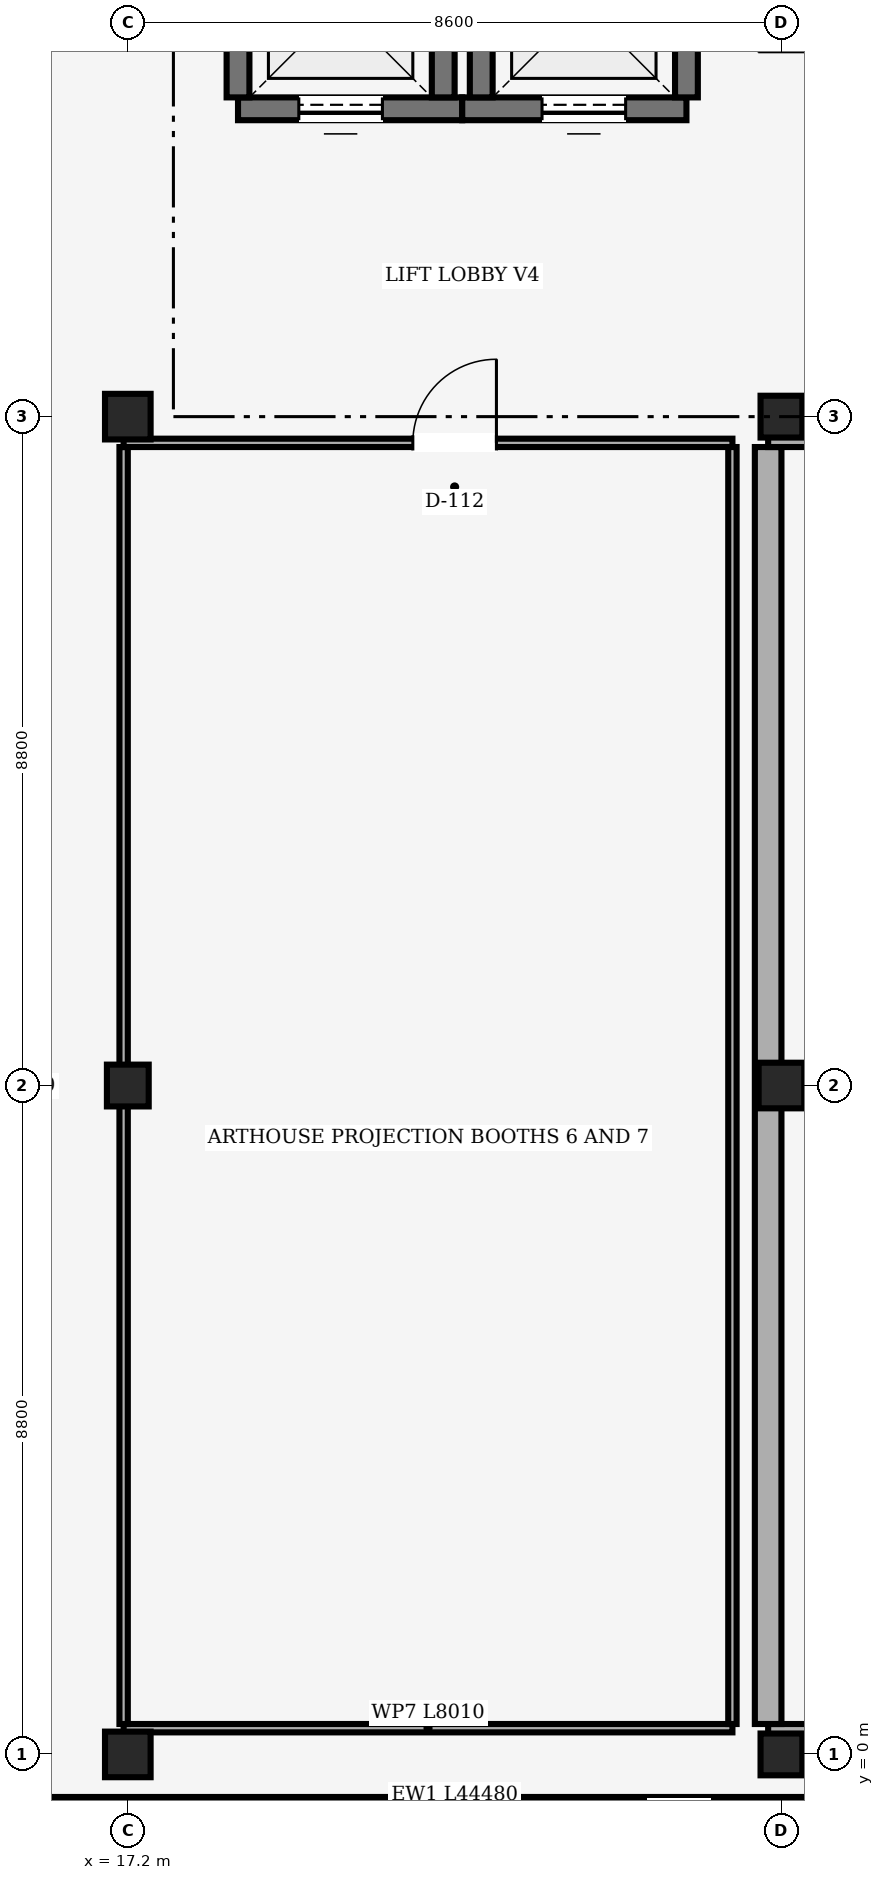
"""IFC4 building model, lengths in metres.
Left out: names, types, materials, properties, quantities, classifications, styles, units other than length and angle.
Written with IfcOpenShell. Run it as: python <this file> out.ifc"""

import sys

from ifc_helpers import new_model, si_unit, direction, frame, frame_2d, origin, origin_2d, place, context, subcontext, project, spatial, rectangle, extrude, element, fill, save


model = new_model("IFC4")
c1 = context("Model", 3, precision=1e-05, world=origin(), true_north=direction((0.0, 1.0)))
c2 = subcontext(c1, "Body", "Model", "MODEL_VIEW")
j1 = project(units=[si_unit("LENGTHUNIT", "METRE"), si_unit("PLANEANGLEUNIT", "RADIAN")], contexts=[c1])
p1 = place(None, origin())
s1 = spatial("IfcSite", under=j1, at=p1, CompositionType="ELEMENT")
p2 = place(p1, origin())
s2 = spatial("IfcBuilding", under=s1, at=p2, CompositionType="ELEMENT")
p3 = place(p2, frame((0.0, 0.0, 22.35)))
s3 = spatial("IfcBuildingStorey", under=s2, at=p3, CompositionType="ELEMENT", Elevation=22.35)
p4 = place(p3, frame((17.2, 0.0, 0.0), z_axis=(0.0, 0.0, 1.0), x_axis=(1.0, 0.0, 0.0)))
e1 = element("IfcColumn", 1, at=p4, inside=s3, PredefinedType="COLUMN", context=c2, shape_type="SweptSolid", body=[
    extrude(rectangle(XDim=0.6, YDim=0.6, at=origin_2d()), origin(), (0.0, 0.0, 1.0), 2.91),
])
p5 = place(p3, frame((17.2, 8.8, 0.0), z_axis=(0.0, 0.0, 1.0), x_axis=(1.0, 0.0, 0.0)))
e2 = element("IfcColumn", 2, at=p5, inside=s3, PredefinedType="COLUMN", context=c2, shape_type="SweptSolid", body=[
    extrude(rectangle(XDim=0.55, YDim=0.55, at=origin_2d()), origin(), (0.0, 0.0, 1.0), 2.91),
])
p6 = place(p3, frame((17.2, 17.6, 0.0), z_axis=(0.0, 0.0, 1.0), x_axis=(1.0, 0.0, 0.0)))
e3 = element("IfcColumn", 3, at=p6, inside=s3, PredefinedType="COLUMN", context=c2, shape_type="SweptSolid", body=[
    extrude(rectangle(XDim=0.6, YDim=0.6, at=origin_2d()), origin(), (0.0, 0.0, 1.0), 2.91),
])
p7 = place(p3, frame((25.8, 0.0, 0.0), z_axis=(0.0, 0.0, 1.0), x_axis=(1.0, 0.0, 0.0)))
e4 = element("IfcColumn", 4, at=p7, inside=s3, PredefinedType="COLUMN", context=c2, shape_type="SweptSolid", body=[
    extrude(rectangle(XDim=0.55, YDim=0.55, at=origin_2d()), origin(), (0.0, 0.0, 1.0), 2.91),
])
p8 = place(p3, frame((25.8, 8.8, 0.0), z_axis=(0.0, 0.0, 1.0), x_axis=(1.0, 0.0, 0.0)))
e5 = element("IfcColumn", 5, at=p8, inside=s3, PredefinedType="COLUMN", context=c2, shape_type="SweptSolid", body=[
    extrude(rectangle(XDim=0.6, YDim=0.6, at=origin_2d()), origin(), (0.0, 0.0, 1.0), 2.91),
])
p9 = place(p3, frame((25.8, 17.6, 0.0), z_axis=(0.0, 0.0, 1.0), x_axis=(1.0, 0.0, 0.0)))
e6 = element("IfcColumn", 6, at=p9, inside=s3, PredefinedType="COLUMN", context=c2, shape_type="SweptSolid", body=[
    extrude(rectangle(XDim=0.55, YDim=0.55, at=origin_2d()), origin(), (0.0, 0.0, 1.0), 2.91),
])
p10 = place(p3, frame((43.74, -0.74, 0.0), z_axis=(0.0, 0.0, 1.0), x_axis=(-1.0, 0.0, 0.0)))
e7 = element("IfcWall", 7, at=p10, inside=s3, PredefinedType="SOLIDWALL", context=c2, shape_type="SweptSolid", body=[
    extrude(rectangle(XDim=44.48, YDim=0.36, at=frame_2d((22.24, 0.0))), origin(), (0.0, 0.0, 1.0), 2.91),
])
p11 = place(p10, frame((9.05, 0.0, 0.36)))
e8 = element("IfcOpeningElement", 8, at=p11, cuts=e7, PredefinedType="OPENING", context=c2, shape_type="SweptSolid", body=[
    extrude(rectangle(XDim=0.28, YDim=0.28, at=frame_2d((0.14, 0.14))), frame((0.0, 0.18, 0.0), z_axis=(0.0, -1.0, 0.0), x_axis=(1.0, 0.0, 0.0)), (0.0, 0.0, 1.0), 0.36),
])
p12 = place(p10, frame((9.95, 0.0, 1.26)))
e9 = element("IfcOpeningElement", 9, at=p12, cuts=e7, PredefinedType="OPENING", context=c2, shape_type="SweptSolid", body=[
    extrude(rectangle(XDim=0.28, YDim=0.28, at=frame_2d((0.14, 0.14))), frame((0.0, 0.18, 0.0), z_axis=(0.0, -1.0, 0.0), x_axis=(1.0, 0.0, 0.0)), (0.0, 0.0, 1.0), 0.36),
])
p13 = place(p10, frame((10.85, 0.0, 1.26)))
e10 = element("IfcOpeningElement", 10, at=p13, cuts=e7, PredefinedType="OPENING", context=c2, shape_type="SweptSolid", body=[
    extrude(rectangle(XDim=0.28, YDim=0.28, at=frame_2d((0.14, 0.14))), frame((0.0, 0.18, 0.0), z_axis=(0.0, -1.0, 0.0), x_axis=(1.0, 0.0, 0.0)), (0.0, 0.0, 1.0), 0.36),
])
p14 = place(p10, frame((13.53, 0.0, 1.26)))
e11 = element("IfcOpeningElement", 11, at=p14, cuts=e7, PredefinedType="OPENING", context=c2, shape_type="SweptSolid", body=[
    extrude(rectangle(XDim=0.32, YDim=0.32, at=frame_2d((0.16, 0.16))), frame((0.0, 0.18, 0.0), z_axis=(0.0, -1.0, 0.0), x_axis=(1.0, 0.0, 0.0)), (0.0, 0.0, 1.0), 0.36),
])
p15 = place(p10, frame((14.44, 0.0, 2.16)))
e12 = element("IfcOpeningElement", 12, at=p15, cuts=e7, PredefinedType="OPENING", context=c2, shape_type="SweptSolid", body=[
    extrude(rectangle(XDim=0.3, YDim=0.3, at=frame_2d((0.15, 0.15))), frame((0.0, 0.18, 0.0), z_axis=(0.0, -1.0, 0.0), x_axis=(1.0, 0.0, 0.0)), (0.0, 0.0, 1.0), 0.36),
])
p16 = place(p10, frame((15.34, 0.0, 2.16)))
e13 = element("IfcOpeningElement", 13, at=p16, cuts=e7, PredefinedType="OPENING", context=c2, shape_type="SweptSolid", body=[
    extrude(rectangle(XDim=0.3, YDim=0.3, at=frame_2d((0.15, 0.15))), frame((0.0, 0.18, 0.0), z_axis=(0.0, -1.0, 0.0), x_axis=(1.0, 0.0, 0.0)), (0.0, 0.0, 1.0), 0.36),
])
p17 = place(p10, frame((16.21, 0.0, 0.36)))
e14 = element("IfcOpeningElement", 14, at=p17, cuts=e7, PredefinedType="OPENING", context=c2, shape_type="SweptSolid", body=[
    extrude(rectangle(XDim=0.36, YDim=0.36, at=frame_2d((0.18, 0.18))), frame((0.0, 0.18, 0.0), z_axis=(0.0, -1.0, 0.0), x_axis=(1.0, 0.0, 0.0)), (0.0, 0.0, 1.0), 0.36),
])
p18 = place(p10, frame((17.11, 0.0, 0.36)))
e15 = element("IfcOpeningElement", 15, at=p18, cuts=e7, PredefinedType="OPENING", context=c2, shape_type="SweptSolid", body=[
    extrude(rectangle(XDim=0.36, YDim=0.36, at=frame_2d((0.18, 0.18))), frame((0.0, 0.18, 0.0), z_axis=(0.0, -1.0, 0.0), x_axis=(1.0, 0.0, 0.0)), (0.0, 0.0, 1.0), 0.36),
])
p19 = place(p10, frame((18.03, 0.0, 2.16)))
e16 = element("IfcOpeningElement", 16, at=p19, cuts=e7, PredefinedType="OPENING", context=c2, shape_type="SweptSolid", body=[
    extrude(rectangle(XDim=0.32, YDim=0.32, at=frame_2d((0.16, 0.16))), frame((0.0, 0.18, 0.0), z_axis=(0.0, -1.0, 0.0), x_axis=(1.0, 0.0, 0.0)), (0.0, 0.0, 1.0), 0.36),
])
p20 = place(p10, frame((18.9, 0.0, 0.36)))
e17 = element("IfcOpeningElement", 17, at=p20, cuts=e7, PredefinedType="OPENING", context=c2, shape_type="SweptSolid", body=[
    extrude(rectangle(XDim=0.38, YDim=0.38, at=frame_2d((0.19, 0.19))), frame((0.0, 0.18, 0.0), z_axis=(0.0, -1.0, 0.0), x_axis=(1.0, 0.0, 0.0)), (0.0, 0.0, 1.0), 0.36),
])
p21 = place(p10, frame((18.92, 0.0, 1.26)))
e18 = element("IfcOpeningElement", 18, at=p21, cuts=e7, PredefinedType="OPENING", context=c2, shape_type="SweptSolid", body=[
    extrude(rectangle(XDim=0.34, YDim=0.34, at=frame_2d((0.17, 0.17))), frame((0.0, 0.18, 0.0), z_axis=(0.0, -1.0, 0.0), x_axis=(1.0, 0.0, 0.0)), (0.0, 0.0, 1.0), 0.36),
])
p22 = place(p10, frame((19.8, 0.0, 0.36)))
e19 = element("IfcOpeningElement", 19, at=p22, cuts=e7, PredefinedType="OPENING", context=c2, shape_type="SweptSolid", body=[
    extrude(rectangle(XDim=0.38, YDim=0.38, at=frame_2d((0.19, 0.19))), frame((0.0, 0.18, 0.0), z_axis=(0.0, -1.0, 0.0), x_axis=(1.0, 0.0, 0.0)), (0.0, 0.0, 1.0), 0.36),
])
p23 = place(p10, frame((20.71, 0.0, 1.26)))
e20 = element("IfcOpeningElement", 20, at=p23, cuts=e7, PredefinedType="OPENING", context=c2, shape_type="SweptSolid", body=[
    extrude(rectangle(XDim=0.36, YDim=0.36, at=frame_2d((0.18, 0.18))), frame((0.0, 0.18, 0.0), z_axis=(0.0, -1.0, 0.0), x_axis=(1.0, 0.0, 0.0)), (0.0, 0.0, 1.0), 0.36),
])
p24 = place(p10, frame((21.6, 0.0, 0.36)))
e21 = element("IfcOpeningElement", 21, at=p24, cuts=e7, PredefinedType="OPENING", context=c2, shape_type="SweptSolid", body=[
    extrude(rectangle(XDim=0.38, YDim=0.38, at=frame_2d((0.19, 0.19))), frame((0.0, 0.18, 0.0), z_axis=(0.0, -1.0, 0.0), x_axis=(1.0, 0.0, 0.0)), (0.0, 0.0, 1.0), 0.36),
])
p25 = place(p10, frame((21.61, 0.0, 1.26)))
e22 = element("IfcOpeningElement", 22, at=p25, cuts=e7, PredefinedType="OPENING", context=c2, shape_type="SweptSolid", body=[
    extrude(rectangle(XDim=0.36, YDim=0.36, at=frame_2d((0.18, 0.18))), frame((0.0, 0.18, 0.0), z_axis=(0.0, -1.0, 0.0), x_axis=(1.0, 0.0, 0.0)), (0.0, 0.0, 1.0), 0.36),
])
p26 = place(p10, frame((22.5, 0.0, 0.36)))
e23 = element("IfcOpeningElement", 23, at=p26, cuts=e7, PredefinedType="OPENING", context=c2, shape_type="SweptSolid", body=[
    extrude(rectangle(XDim=0.38, YDim=0.38, at=frame_2d((0.19, 0.19))), frame((0.0, 0.18, 0.0), z_axis=(0.0, -1.0, 0.0), x_axis=(1.0, 0.0, 0.0)), (0.0, 0.0, 1.0), 0.36),
])
p27 = place(p10, frame((23.41, 0.0, 1.26)))
e24 = element("IfcOpeningElement", 24, at=p27, cuts=e7, PredefinedType="OPENING", context=c2, shape_type="SweptSolid", body=[
    extrude(rectangle(XDim=0.36, YDim=0.36, at=frame_2d((0.18, 0.18))), frame((0.0, 0.18, 0.0), z_axis=(0.0, -1.0, 0.0), x_axis=(1.0, 0.0, 0.0)), (0.0, 0.0, 1.0), 0.36),
])
p28 = place(p10, frame((24.3, 0.0, 0.36)))
e25 = element("IfcOpeningElement", 25, at=p28, cuts=e7, PredefinedType="OPENING", context=c2, shape_type="SweptSolid", body=[
    extrude(rectangle(XDim=0.38, YDim=0.38, at=frame_2d((0.19, 0.19))), frame((0.0, 0.18, 0.0), z_axis=(0.0, -1.0, 0.0), x_axis=(1.0, 0.0, 0.0)), (0.0, 0.0, 1.0), 0.36),
])
p29 = place(p10, frame((24.32, 0.0, 1.26)))
e26 = element("IfcOpeningElement", 26, at=p29, cuts=e7, PredefinedType="OPENING", context=c2, shape_type="SweptSolid", body=[
    extrude(rectangle(XDim=0.34, YDim=0.34, at=frame_2d((0.17, 0.17))), frame((0.0, 0.18, 0.0), z_axis=(0.0, -1.0, 0.0), x_axis=(1.0, 0.0, 0.0)), (0.0, 0.0, 1.0), 0.36),
])
p30 = place(p10, frame((25.2, 0.0, 0.36)))
e27 = element("IfcOpeningElement", 27, at=p30, cuts=e7, PredefinedType="OPENING", context=c2, shape_type="SweptSolid", body=[
    extrude(rectangle(XDim=0.38, YDim=0.38, at=frame_2d((0.19, 0.19))), frame((0.0, 0.18, 0.0), z_axis=(0.0, -1.0, 0.0), x_axis=(1.0, 0.0, 0.0)), (0.0, 0.0, 1.0), 0.36),
])
p31 = place(p10, frame((25.23, 0.0, 2.16)))
e28 = element("IfcOpeningElement", 28, at=p31, cuts=e7, PredefinedType="OPENING", context=c2, shape_type="SweptSolid", body=[
    extrude(rectangle(XDim=0.32, YDim=0.32, at=frame_2d((0.16, 0.16))), frame((0.0, 0.18, 0.0), z_axis=(0.0, -1.0, 0.0), x_axis=(1.0, 0.0, 0.0)), (0.0, 0.0, 1.0), 0.36),
])
p32 = place(p10, frame((26.13, 0.0, 2.16)))
e29 = element("IfcOpeningElement", 29, at=p32, cuts=e7, PredefinedType="OPENING", context=c2, shape_type="SweptSolid", body=[
    extrude(rectangle(XDim=0.32, YDim=0.32, at=frame_2d((0.16, 0.16))), frame((0.0, 0.18, 0.0), z_axis=(0.0, -1.0, 0.0), x_axis=(1.0, 0.0, 0.0)), (0.0, 0.0, 1.0), 0.36),
])
p33 = place(p10, frame((27.01, 0.0, 0.36)))
e30 = element("IfcOpeningElement", 30, at=p33, cuts=e7, PredefinedType="OPENING", context=c2, shape_type="SweptSolid", body=[
    extrude(rectangle(XDim=0.36, YDim=0.36, at=frame_2d((0.18, 0.18))), frame((0.0, 0.18, 0.0), z_axis=(0.0, -1.0, 0.0), x_axis=(1.0, 0.0, 0.0)), (0.0, 0.0, 1.0), 0.36),
])
p34 = place(p10, frame((27.91, 0.0, 0.36)))
e31 = element("IfcOpeningElement", 31, at=p34, cuts=e7, PredefinedType="OPENING", context=c2, shape_type="SweptSolid", body=[
    extrude(rectangle(XDim=0.36, YDim=0.36, at=frame_2d((0.18, 0.18))), frame((0.0, 0.18, 0.0), z_axis=(0.0, -1.0, 0.0), x_axis=(1.0, 0.0, 0.0)), (0.0, 0.0, 1.0), 0.36),
])
p35 = place(p10, frame((28.84, 0.0, 2.16)))
e32 = element("IfcOpeningElement", 32, at=p35, cuts=e7, PredefinedType="OPENING", context=c2, shape_type="SweptSolid", body=[
    extrude(rectangle(XDim=0.3, YDim=0.3, at=frame_2d((0.15, 0.15))), frame((0.0, 0.18, 0.0), z_axis=(0.0, -1.0, 0.0), x_axis=(1.0, 0.0, 0.0)), (0.0, 0.0, 1.0), 0.36),
])
p36 = place(p10, frame((30.62, 0.0, 0.36)))
e33 = element("IfcOpeningElement", 33, at=p36, cuts=e7, PredefinedType="OPENING", context=c2, shape_type="SweptSolid", body=[
    extrude(rectangle(XDim=0.34, YDim=0.34, at=frame_2d((0.17, 0.17))), frame((0.0, 0.18, 0.0), z_axis=(0.0, -1.0, 0.0), x_axis=(1.0, 0.0, 0.0)), (0.0, 0.0, 1.0), 0.36),
])
p37 = place(p10, frame((31.54, 0.0, 1.26)))
e34 = element("IfcOpeningElement", 34, at=p37, cuts=e7, PredefinedType="OPENING", context=c2, shape_type="SweptSolid", body=[
    extrude(rectangle(XDim=0.3, YDim=0.3, at=frame_2d((0.15, 0.15))), frame((0.0, 0.18, 0.0), z_axis=(0.0, -1.0, 0.0), x_axis=(1.0, 0.0, 0.0)), (0.0, 0.0, 1.0), 0.36),
])
p38 = place(p10, frame((32.44, 0.0, 1.26)))
e35 = element("IfcOpeningElement", 35, at=p38, cuts=e7, PredefinedType="OPENING", context=c2, shape_type="SweptSolid", body=[
    extrude(rectangle(XDim=0.3, YDim=0.3, at=frame_2d((0.15, 0.15))), frame((0.0, 0.18, 0.0), z_axis=(0.0, -1.0, 0.0), x_axis=(1.0, 0.0, 0.0)), (0.0, 0.0, 1.0), 0.36),
])
p39 = place(p3, frame((21.6, 21.65, 0.0), z_axis=(0.0, 0.0, 1.0), x_axis=(-1.0, 0.0, 0.0)))
e36 = element("IfcWall", 36, at=p39, inside=s3, PredefinedType="SHEAR", context=c2, shape_type="SweptSolid", body=[
    extrude(rectangle(XDim=2.95, YDim=0.3, at=frame_2d((1.475, 0.0))), origin(), (0.0, 0.0, 1.0), 2.91),
])
p40 = place(p39, frame((1.05, 0.0, 0.0)))
e37 = element("IfcOpeningElement", 37, at=p40, cuts=e36, PredefinedType="OPENING", context=c2, shape_type="SweptSolid", body=[
    extrude(rectangle(XDim=1.1, YDim=2.1, at=frame_2d((0.55, 1.05))), frame((0.0, 0.15, 0.0), z_axis=(0.0, -1.0, 0.0), x_axis=(1.0, 0.0, 0.0)), (0.0, 0.0, 1.0), 0.3),
])
for number, where, z_axis, x_axis in (
    (38, (18.65, 21.8, 0.0), (0.0, 0.0, 1.0), (0.0, 1.0, 0.0)),
    (39, (21.35, 24.2, 0.0), (0.0, 0.0, 1.0), (0.0, -1.0, 0.0)),
):
    element("IfcWall", number, at=place(p3, frame(where, z_axis=z_axis, x_axis=x_axis)), inside=s3, PredefinedType="SHEAR", context=c2, shape_type="SweptSolid", body=[
        extrude(rectangle(XDim=2.4, YDim=0.3, at=frame_2d((1.2, 0.0))), origin(), (0.0, 0.0, 1.0), 2.91),
    ])
p41 = place(p3, frame((24.55, 21.65, 0.0), z_axis=(0.0, 0.0, 1.0), x_axis=(-1.0, 0.0, 0.0)))
e40 = element("IfcWall", 40, at=p41, inside=s3, PredefinedType="SHEAR", context=c2, shape_type="SweptSolid", body=[
    extrude(rectangle(XDim=2.95, YDim=0.3, at=frame_2d((1.475, 0.0))), origin(), (0.0, 0.0, 1.0), 2.91),
])
p42 = place(p41, frame((0.8, 0.0, 0.0)))
e41 = element("IfcOpeningElement", 41, at=p42, cuts=e40, PredefinedType="OPENING", context=c2, shape_type="SweptSolid", body=[
    extrude(rectangle(XDim=1.1, YDim=2.1, at=frame_2d((0.55, 1.05))), frame((0.0, 0.15, 0.0), z_axis=(0.0, -1.0, 0.0), x_axis=(1.0, 0.0, 0.0)), (0.0, 0.0, 1.0), 0.3),
])
for number, where, z_axis, x_axis in (
    (42, (21.85, 21.8, 0.0), (0.0, 0.0, 1.0), (0.0, 1.0, 0.0)),
    (43, (24.55, 24.2, 0.0), (0.0, 0.0, 1.0), (0.0, -1.0, 0.0)),
):
    element("IfcWall", number, at=place(p3, frame(where, z_axis=z_axis, x_axis=x_axis)), inside=s3, PredefinedType="SHEAR", context=c2, shape_type="SweptSolid", body=[
        extrude(rectangle(XDim=2.4, YDim=0.3, at=frame_2d((1.2, 0.0))), origin(), (0.0, 0.0, 1.0), 2.91),
    ])
p43 = place(p3, frame((42.975, 0.225, 0.0), z_axis=(0.0, 0.0, 1.0), x_axis=(-1.0, 0.0, 0.0)))
e44 = element("IfcWall", 44, at=p43, inside=s3, PredefinedType="SOLIDWALL", context=c2, shape_type="SweptSolid", body=[
    extrude(rectangle(XDim=17.35, YDim=0.35, at=frame_2d((8.675, 0.0))), origin(), (0.0, 0.0, 1.0), 2.29),
])
p44 = place(p3, frame((25.625, 0.4, 0.0), z_axis=(0.0, 0.0, 1.0), x_axis=(0.0, 1.0, 0.0)))
e45 = element("IfcWall", 45, at=p44, inside=s3, PredefinedType="SOLIDWALL", context=c2, shape_type="SweptSolid", body=[
    extrude(rectangle(XDim=16.8, YDim=0.35, at=frame_2d((8.4, 0.0))), origin(), (0.0, 0.0, 1.0), 2.29),
])
p45 = place(p3, frame((25.625, 17.375, 0.0), z_axis=(0.0, 0.0, 1.0), x_axis=(1.0, 0.0, 0.0)))
e46 = element("IfcWall", 46, at=p45, inside=s3, PredefinedType="SOLIDWALL", context=c2, shape_type="SweptSolid", body=[
    extrude(rectangle(XDim=17.35, YDim=0.35, at=frame_2d((8.675, 0.0))), origin(), (0.0, 0.0, 1.0), 2.29),
])
p46 = place(p45, frame((4.675, 0.0, 0.0)))
e47 = element("IfcOpeningElement", 47, at=p46, cuts=e46, PredefinedType="OPENING", context=c2, shape_type="SweptSolid", body=[
    extrude(rectangle(XDim=1.4, YDim=2.15, at=frame_2d((0.7, 1.075))), frame((0.0, 0.175, 0.0), z_axis=(0.0, -1.0, 0.0), x_axis=(1.0, 0.0, 0.0)), (0.0, 0.0, 1.0), 0.35),
])
p47 = place(p3, frame((25.155, 0.345, 0.0), z_axis=(0.0, 0.0, 1.0), x_axis=(-1.0, 0.0, 0.0)))
e48 = element("IfcWall", 48, at=p47, inside=s3, PredefinedType="PARTITIONING", context=c2, shape_type="SweptSolid", body=[
    extrude(rectangle(XDim=8.01, YDim=0.11, at=frame_2d((4.005, 0.0))), origin(), (0.0, 0.0, 1.0), 2.29),
])
p48 = place(p3, frame((17.145, 0.4, 0.0), z_axis=(0.0, 0.0, 1.0), x_axis=(0.0, 1.0, 0.0)))
e49 = element("IfcWall", 49, at=p48, inside=s3, PredefinedType="PARTITIONING", context=c2, shape_type="SweptSolid", body=[
    extrude(rectangle(XDim=16.8, YDim=0.11, at=frame_2d((8.4, 0.0))), origin(), (0.0, 0.0, 1.0), 2.29),
])
p49 = place(p3, frame((17.145, 17.255, 0.0), z_axis=(0.0, 0.0, 1.0), x_axis=(1.0, 0.0, 0.0)))
e50 = element("IfcWall", 50, at=p49, inside=s3, PredefinedType="PARTITIONING", context=c2, shape_type="SweptSolid", body=[
    extrude(rectangle(XDim=8.01, YDim=0.11, at=frame_2d((4.005, 0.0))), origin(), (0.0, 0.0, 1.0), 2.34),
])
p50 = place(p49, frame((3.805, 0.0, 0.0)))
e51 = element("IfcOpeningElement", 51, at=p50, cuts=e50, PredefinedType="OPENING", context=c2, shape_type="SweptSolid", body=[
    extrude(rectangle(XDim=1.1, YDim=2.1, at=frame_2d((0.55, 1.05))), frame((0.0, 0.055, 0.0), z_axis=(0.0, -1.0, 0.0), x_axis=(1.0, 0.0, 0.0)), (0.0, 0.0, 1.0), 0.11),
])
p51 = place(p3, frame((25.155, 17.2, 0.0), z_axis=(0.0, 0.0, 1.0), x_axis=(0.0, -1.0, 0.0)))
e52 = element("IfcWall", 52, at=p51, inside=s3, PredefinedType="PARTITIONING", context=c2, shape_type="SweptSolid", body=[
    extrude(rectangle(XDim=16.8, YDim=0.11, at=frame_2d((8.4, 0.0))), origin(), (0.0, 0.0, 1.0), 2.89),
])
p52 = place(p40, origin())
e53 = element("IfcDoor", 53, at=p52, inside=s3, OperationType="SLIDING_TO_LEFT", PredefinedType="DOOR", context=c2, shape_type="SweptSolid", body=[
    extrude(rectangle(XDim=1.1, YDim=2.1, at=frame_2d((0.55, 1.05))), frame((0.0, 0.025, 0.0), z_axis=(0.0, -1.0, 0.0), x_axis=(1.0, 0.0, 0.0)), (0.0, 0.0, 1.0), 0.05),
])
fill(e37, e53)
p53 = place(p42, origin())
e54 = element("IfcDoor", 54, at=p53, inside=s3, OperationType="SLIDING_TO_LEFT", PredefinedType="DOOR", context=c2, shape_type="SweptSolid", body=[
    extrude(rectangle(XDim=1.1, YDim=2.1, at=frame_2d((0.55, 1.05))), frame((0.0, 0.025, 0.0), z_axis=(0.0, -1.0, 0.0), x_axis=(1.0, 0.0, 0.0)), (0.0, 0.0, 1.0), 0.05),
])
fill(e41, e54)
p54 = place(p50, origin())
e55 = element("IfcDoor", 55, at=p54, inside=s3, OperationType="SINGLE_SWING_RIGHT", PredefinedType="DOOR", context=c2, shape_type="SweptSolid", body=[
    extrude(rectangle(XDim=1.1, YDim=2.1, at=frame_2d((0.55, 1.05))), frame((0.0, 0.025, 0.0), z_axis=(0.0, -1.0, 0.0), x_axis=(1.0, 0.0, 0.0)), (0.0, 0.0, 1.0), 0.05),
])
fill(e51, e55)
save(model, sys.argv[1])
